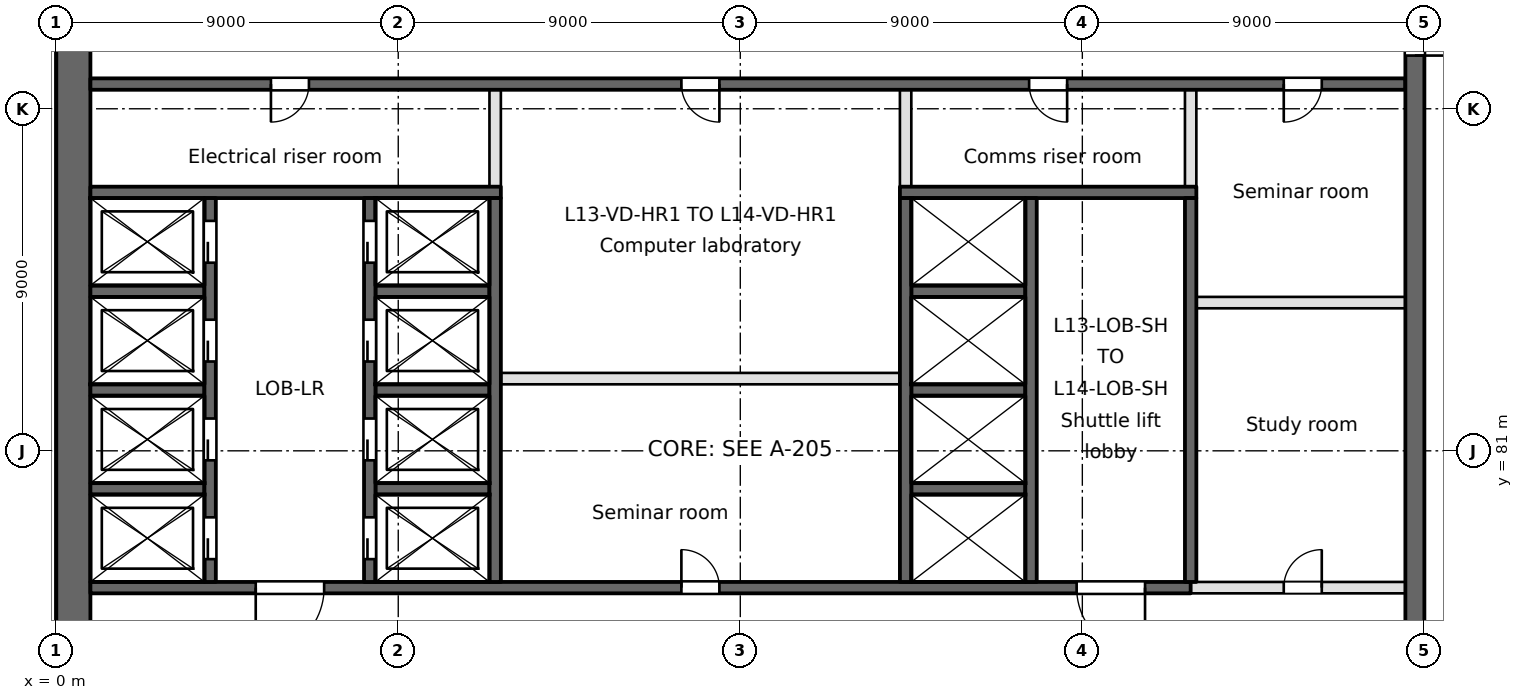
"""IFC4 building model, lengths in metres.
Left out: names, types, materials, properties, quantities, classifications, styles, units other than length and angle.
Written with IfcOpenShell. Run it as: python <this file> out.ifc"""

import sys

from ifc_helpers import new_model, si_unit, direction, frame, frame_2d, origin, place, context, subcontext, project, spatial, rectangle, extrude, element, fill, save


model = new_model("IFC4")
c1 = context("Model", 3, precision=1e-05, world=origin(), true_north=direction((0.0, 1.0)))
c2 = subcontext(c1, "Body", "Model", "MODEL_VIEW")
j1 = project(units=[si_unit("LENGTHUNIT", "METRE"), si_unit("PLANEANGLEUNIT", "RADIAN")], contexts=[c1])
p1 = place(None, origin())
s1 = spatial("IfcSite", under=j1, at=p1, CompositionType="ELEMENT")
p2 = place(p1, origin())
s2 = spatial("IfcBuilding", under=s1, at=p2, CompositionType="ELEMENT")
p3 = place(p2, frame((0.0, 0.0, 58.0)))
s3 = spatial("IfcBuildingStorey", under=s2, at=p3, CompositionType="ELEMENT", Elevation=58.0)
p4 = place(p3, frame((0.45, 94.5, 0.0), z_axis=(0.0, 0.0, 1.0), x_axis=(0.0, -1.0, 0.0)))
e1 = element("IfcWall", 1, at=p4, inside=s3, PredefinedType="SHEAR", context=c2, shape_type="SweptSolid", body=[
    extrude(rectangle(XDim=66.187, YDim=0.9, at=frame_2d((33.094, 0.0))), origin(), (0.0, 0.0, 1.0), 3.7),
])
p5 = place(p3, frame((0.9, 77.4, -0.4), z_axis=(0.0, 0.0, 1.0), x_axis=(1.0, 0.0, 0.0)))
e2 = element("IfcWall", 2, at=p5, inside=s3, PredefinedType="SOLIDWALL", context=c2, shape_type="SweptSolid", body=[
    extrude(rectangle(XDim=28.95, YDim=0.3, at=frame_2d((14.475, 0.0))), origin(), (0.0, 0.0, 1.0), 3.7),
])
p6 = place(p5, frame((4.35, 0.0, 0.4)))
e3 = element("IfcOpeningElement", 3, at=p6, cuts=e2, PredefinedType="OPENING", context=c2, shape_type="SweptSolid", body=[
    extrude(rectangle(XDim=1.8, YDim=2.1, at=frame_2d((0.9, 1.05))), frame((0.0, 0.15, 0.0), z_axis=(0.0, -1.0, 0.0), x_axis=(1.0, 0.0, 0.0)), (0.0, 0.0, 1.0), 0.3),
])
p7 = place(p5, frame((25.95, 0.0, 0.4)))
e4 = element("IfcOpeningElement", 4, at=p7, cuts=e2, PredefinedType="OPENING", context=c2, shape_type="SweptSolid", body=[
    extrude(rectangle(XDim=1.8, YDim=2.1, at=frame_2d((0.9, 1.05))), frame((0.0, 0.15, 0.0), z_axis=(0.0, -1.0, 0.0), x_axis=(1.0, 0.0, 0.0)), (0.0, 0.0, 1.0), 0.3),
])
p8 = place(p5, frame((15.55, 0.0, 0.4)))
e5 = element("IfcOpeningElement", 5, at=p8, cuts=e2, PredefinedType="OPENING", context=c2, shape_type="SweptSolid", body=[
    extrude(rectangle(XDim=1.0, YDim=2.1, at=frame_2d((0.5, 1.05))), frame((0.0, 0.15, 0.0), z_axis=(0.0, -1.0, 0.0), x_axis=(1.0, 0.0, 0.0)), (0.0, 0.0, 1.0), 0.3),
])
p9 = place(p3, frame((29.85, 77.4, 0.0), z_axis=(0.0, 0.0, 1.0), x_axis=(1.0, 0.0, 0.0)))
e6 = element("IfcWall", 6, at=p9, inside=s3, PredefinedType="PARTITIONING", context=c2, shape_type="SweptSolid", body=[
    extrude(rectangle(XDim=5.65, YDim=0.3, at=frame_2d((2.825, 0.0))), origin(), (0.0, 0.0, 1.0), 3.3),
])
p10 = place(p9, frame((2.45, 0.0, 0.0)))
e7 = element("IfcOpeningElement", 7, at=p10, cuts=e6, PredefinedType="OPENING", context=c2, shape_type="SweptSolid", body=[
    extrude(rectangle(XDim=1.0, YDim=2.1, at=frame_2d((0.5, 1.05))), frame((0.0, 0.15, 0.0), z_axis=(0.0, -1.0, 0.0), x_axis=(1.0, 0.0, 0.0)), (0.0, 0.0, 1.0), 0.3),
])
for number, where, z_axis, x_axis in (
    (8, (0.9, 80.0, -0.4), (0.0, 0.0, 1.0), (1.0, 0.0, 0.0)),
    (9, (8.4, 80.0, -0.4), (0.0, 0.0, 1.0), (1.0, 0.0, 0.0)),
    (10, (22.5, 80.0, -0.4), (0.0, 0.0, 1.0), (1.0, 0.0, 0.0)),
    (11, (0.9, 82.6, -0.4), (0.0, 0.0, 1.0), (1.0, 0.0, 0.0)),
    (12, (8.4, 82.6, -0.4), (0.0, 0.0, 1.0), (1.0, 0.0, 0.0)),
    (13, (22.5, 82.6, -0.4), (0.0, 0.0, 1.0), (1.0, 0.0, 0.0)),
):
    element("IfcWall", number, at=place(p3, frame(where, z_axis=z_axis, x_axis=x_axis)), inside=s3, PredefinedType="SOLIDWALL", context=c2, shape_type="SweptSolid", body=[
        extrude(rectangle(XDim=3.0, YDim=0.3, at=frame_2d((1.5, 0.0))), origin(), (0.0, 0.0, 1.0), 3.7),
    ])
p11 = place(p3, frame((11.7, 82.9, 0.0), z_axis=(0.0, 0.0, 1.0), x_axis=(1.0, 0.0, 0.0)))
e14 = element("IfcWall", 14, at=p11, inside=s3, PredefinedType="PARTITIONING", context=c2, shape_type="SweptSolid", body=[
    extrude(rectangle(XDim=10.5, YDim=0.3, at=frame_2d((5.25, 0.0))), origin(), (0.0, 0.0, 1.0), 3.3),
])
p12 = place(p3, frame((30.0, 84.9, 0.0), z_axis=(0.0, 0.0, 1.0), x_axis=(1.0, 0.0, 0.0)))
e15 = element("IfcWall", 15, at=p12, inside=s3, PredefinedType="PARTITIONING", context=c2, shape_type="SweptSolid", body=[
    extrude(rectangle(XDim=5.5, YDim=0.3, at=frame_2d((2.75, 0.0))), origin(), (0.0, 0.0, 1.0), 3.3),
])
for number, where, z_axis, x_axis in (
    (16, (0.9, 85.2, -0.4), (0.0, 0.0, 1.0), (1.0, 0.0, 0.0)),
    (17, (8.4, 85.2, -0.4), (0.0, 0.0, 1.0), (1.0, 0.0, 0.0)),
    (18, (22.5, 85.2, -0.4), (0.0, 0.0, 1.0), (1.0, 0.0, 0.0)),
):
    element("IfcWall", number, at=place(p3, frame(where, z_axis=z_axis, x_axis=x_axis)), inside=s3, PredefinedType="SOLIDWALL", context=c2, shape_type="SweptSolid", body=[
        extrude(rectangle(XDim=3.0, YDim=0.3, at=frame_2d((1.5, 0.0))), origin(), (0.0, 0.0, 1.0), 3.7),
    ])
p13 = place(p3, frame((0.9, 87.8, -0.4), z_axis=(0.0, 0.0, 1.0), x_axis=(1.0, 0.0, 0.0)))
e19 = element("IfcWall", 19, at=p13, inside=s3, PredefinedType="SOLIDWALL", context=c2, shape_type="SweptSolid", body=[
    extrude(rectangle(XDim=10.8, YDim=0.3, at=frame_2d((5.4, 0.0))), origin(), (0.0, 0.0, 1.0), 3.7),
])
p14 = place(p3, frame((22.2, 87.8, -0.4), z_axis=(0.0, 0.0, 1.0), x_axis=(1.0, 0.0, 0.0)))
e20 = element("IfcWall", 20, at=p14, inside=s3, PredefinedType="SOLIDWALL", context=c2, shape_type="SweptSolid", body=[
    extrude(rectangle(XDim=7.8, YDim=0.3, at=frame_2d((3.9, 0.0))), origin(), (0.0, 0.0, 1.0), 3.7),
])
p15 = place(p3, frame((0.9, 90.65, -0.4), z_axis=(0.0, 0.0, 1.0), x_axis=(1.0, 0.0, 0.0)))
e21 = element("IfcWall", 21, at=p15, inside=s3, PredefinedType="SOLIDWALL", context=c2, shape_type="SweptSolid", body=[
    extrude(rectangle(XDim=34.6, YDim=0.3, at=frame_2d((17.3, 0.0))), origin(), (0.0, 0.0, 1.0), 3.7),
])
p16 = place(p15, frame((4.75, 0.0, 0.4)))
e22 = element("IfcOpeningElement", 22, at=p16, cuts=e21, PredefinedType="OPENING", context=c2, shape_type="SweptSolid", body=[
    extrude(rectangle(XDim=1.0, YDim=2.1, at=frame_2d((0.5, 1.05))), frame((0.0, 0.15, 0.0), z_axis=(0.0, -1.0, 0.0), x_axis=(1.0, 0.0, 0.0)), (0.0, 0.0, 1.0), 0.3),
])
p17 = place(p15, frame((24.7, 0.0, 0.4)))
e23 = element("IfcOpeningElement", 23, at=p17, cuts=e21, PredefinedType="OPENING", context=c2, shape_type="SweptSolid", body=[
    extrude(rectangle(XDim=1.0, YDim=2.1, at=frame_2d((0.5, 1.05))), frame((0.0, 0.15, 0.0), z_axis=(0.0, -1.0, 0.0), x_axis=(1.0, 0.0, 0.0)), (0.0, 0.0, 1.0), 0.3),
])
p18 = place(p15, frame((15.55, 0.0, 0.4)))
e24 = element("IfcOpeningElement", 24, at=p18, cuts=e21, PredefinedType="OPENING", context=c2, shape_type="SweptSolid", body=[
    extrude(rectangle(XDim=1.0, YDim=2.1, at=frame_2d((0.5, 1.05))), frame((0.0, 0.15, 0.0), z_axis=(0.0, -1.0, 0.0), x_axis=(1.0, 0.0, 0.0)), (0.0, 0.0, 1.0), 0.3),
])
p19 = place(p15, frame((31.4, 0.0, 0.4)))
e25 = element("IfcOpeningElement", 25, at=p19, cuts=e21, PredefinedType="OPENING", context=c2, shape_type="SweptSolid", body=[
    extrude(rectangle(XDim=1.0, YDim=2.1, at=frame_2d((0.5, 1.05))), frame((0.0, 0.15, 0.0), z_axis=(0.0, -1.0, 0.0), x_axis=(1.0, 0.0, 0.0)), (0.0, 0.0, 1.0), 0.3),
])
p20 = place(p3, frame((4.05, 77.55, -0.4), z_axis=(0.0, 0.0, 1.0), x_axis=(0.0, 1.0, 0.0)))
e26 = element("IfcWall", 26, at=p20, inside=s3, PredefinedType="SOLIDWALL", context=c2, shape_type="SweptSolid", body=[
    extrude(rectangle(XDim=10.1, YDim=0.3, at=frame_2d((5.05, 0.0))), origin(), (0.0, 0.0, 1.0), 3.7),
])
p21 = place(p20, frame((0.6, 0.0, 0.4)))
e27 = element("IfcOpeningElement", 27, at=p21, cuts=e26, PredefinedType="OPENING", context=c2, shape_type="SweptSolid", body=[
    extrude(rectangle(XDim=1.1, YDim=2.1, at=frame_2d((0.55, 1.05))), frame((0.0, 0.15, 0.0), z_axis=(0.0, -1.0, 0.0), x_axis=(1.0, 0.0, 0.0)), (0.0, 0.0, 1.0), 0.3),
])
p22 = place(p20, frame((3.2, 0.0, 0.4)))
e28 = element("IfcOpeningElement", 28, at=p22, cuts=e26, PredefinedType="OPENING", context=c2, shape_type="SweptSolid", body=[
    extrude(rectangle(XDim=1.1, YDim=2.1, at=frame_2d((0.55, 1.05))), frame((0.0, 0.15, 0.0), z_axis=(0.0, -1.0, 0.0), x_axis=(1.0, 0.0, 0.0)), (0.0, 0.0, 1.0), 0.3),
])
p23 = place(p20, frame((5.8, 0.0, 0.4)))
e29 = element("IfcOpeningElement", 29, at=p23, cuts=e26, PredefinedType="OPENING", context=c2, shape_type="SweptSolid", body=[
    extrude(rectangle(XDim=1.1, YDim=2.1, at=frame_2d((0.55, 1.05))), frame((0.0, 0.15, 0.0), z_axis=(0.0, -1.0, 0.0), x_axis=(1.0, 0.0, 0.0)), (0.0, 0.0, 1.0), 0.3),
])
p24 = place(p20, frame((8.4, 0.0, 0.4)))
e30 = element("IfcOpeningElement", 30, at=p24, cuts=e26, PredefinedType="OPENING", context=c2, shape_type="SweptSolid", body=[
    extrude(rectangle(XDim=1.1, YDim=2.1, at=frame_2d((0.55, 1.05))), frame((0.0, 0.15, 0.0), z_axis=(0.0, -1.0, 0.0), x_axis=(1.0, 0.0, 0.0)), (0.0, 0.0, 1.0), 0.3),
])
p25 = place(p3, frame((8.25, 77.55, -0.4), z_axis=(0.0, 0.0, 1.0), x_axis=(0.0, 1.0, 0.0)))
e31 = element("IfcWall", 31, at=p25, inside=s3, PredefinedType="SOLIDWALL", context=c2, shape_type="SweptSolid", body=[
    extrude(rectangle(XDim=10.1, YDim=0.3, at=frame_2d((5.05, 0.0))), origin(), (0.0, 0.0, 1.0), 3.7),
])
p26 = place(p25, frame((0.6, 0.0, 0.4)))
e32 = element("IfcOpeningElement", 32, at=p26, cuts=e31, PredefinedType="OPENING", context=c2, shape_type="SweptSolid", body=[
    extrude(rectangle(XDim=1.1, YDim=2.1, at=frame_2d((0.55, 1.05))), frame((0.0, 0.15, 0.0), z_axis=(0.0, -1.0, 0.0), x_axis=(1.0, 0.0, 0.0)), (0.0, 0.0, 1.0), 0.3),
])
p27 = place(p25, frame((3.2, 0.0, 0.4)))
e33 = element("IfcOpeningElement", 33, at=p27, cuts=e31, PredefinedType="OPENING", context=c2, shape_type="SweptSolid", body=[
    extrude(rectangle(XDim=1.1, YDim=2.1, at=frame_2d((0.55, 1.05))), frame((0.0, 0.15, 0.0), z_axis=(0.0, -1.0, 0.0), x_axis=(1.0, 0.0, 0.0)), (0.0, 0.0, 1.0), 0.3),
])
p28 = place(p25, frame((5.8, 0.0, 0.4)))
e34 = element("IfcOpeningElement", 34, at=p28, cuts=e31, PredefinedType="OPENING", context=c2, shape_type="SweptSolid", body=[
    extrude(rectangle(XDim=1.1, YDim=2.1, at=frame_2d((0.55, 1.05))), frame((0.0, 0.15, 0.0), z_axis=(0.0, -1.0, 0.0), x_axis=(1.0, 0.0, 0.0)), (0.0, 0.0, 1.0), 0.3),
])
p29 = place(p25, frame((8.4, 0.0, 0.4)))
e35 = element("IfcOpeningElement", 35, at=p29, cuts=e31, PredefinedType="OPENING", context=c2, shape_type="SweptSolid", body=[
    extrude(rectangle(XDim=1.1, YDim=2.1, at=frame_2d((0.55, 1.05))), frame((0.0, 0.15, 0.0), z_axis=(0.0, -1.0, 0.0), x_axis=(1.0, 0.0, 0.0)), (0.0, 0.0, 1.0), 0.3),
])
p30 = place(p3, frame((11.55, 77.55, -0.4), z_axis=(0.0, 0.0, 1.0), x_axis=(0.0, 1.0, 0.0)))
e36 = element("IfcWall", 36, at=p30, inside=s3, PredefinedType="SOLIDWALL", context=c2, shape_type="SweptSolid", body=[
    extrude(rectangle(XDim=10.1, YDim=0.3, at=frame_2d((5.05, 0.0))), origin(), (0.0, 0.0, 1.0), 3.7),
])
p31 = place(p3, frame((11.55, 87.95, 0.0), z_axis=(0.0, 0.0, 1.0), x_axis=(0.0, 1.0, 0.0)))
e37 = element("IfcWall", 37, at=p31, inside=s3, PredefinedType="PARTITIONING", context=c2, shape_type="SweptSolid", body=[
    extrude(rectangle(XDim=2.55, YDim=0.3, at=frame_2d((1.275, 0.0))), origin(), (0.0, 0.0, 1.0), 3.3),
])
p32 = place(p3, frame((22.35, 77.55, -0.4), z_axis=(0.0, 0.0, 1.0), x_axis=(0.0, 1.0, 0.0)))
e38 = element("IfcWall", 38, at=p32, inside=s3, PredefinedType="SOLIDWALL", context=c2, shape_type="SweptSolid", body=[
    extrude(rectangle(XDim=10.1, YDim=0.3, at=frame_2d((5.05, 0.0))), origin(), (0.0, 0.0, 1.0), 3.7),
])
p33 = place(p3, frame((22.35, 87.95, 0.0), z_axis=(0.0, 0.0, 1.0), x_axis=(0.0, 1.0, 0.0)))
e39 = element("IfcWall", 39, at=p33, inside=s3, PredefinedType="PARTITIONING", context=c2, shape_type="SweptSolid", body=[
    extrude(rectangle(XDim=2.55, YDim=0.3, at=frame_2d((1.275, 0.0))), origin(), (0.0, 0.0, 1.0), 3.3),
])
for number, where, z_axis, x_axis in (
    (40, (25.65, 77.55, -0.4), (0.0, 0.0, 1.0), (0.0, 1.0, 0.0)),
    (41, (29.85, 77.55, -0.4), (0.0, 0.0, 1.0), (0.0, 1.0, 0.0)),
):
    element("IfcWall", number, at=place(p3, frame(where, z_axis=z_axis, x_axis=x_axis)), inside=s3, PredefinedType="SOLIDWALL", context=c2, shape_type="SweptSolid", body=[
        extrude(rectangle(XDim=10.1, YDim=0.3, at=frame_2d((5.05, 0.0))), origin(), (0.0, 0.0, 1.0), 3.7),
    ])
p34 = place(p3, frame((29.85, 87.95, 0.0), z_axis=(0.0, 0.0, 1.0), x_axis=(0.0, 1.0, 0.0)))
e42 = element("IfcWall", 42, at=p34, inside=s3, PredefinedType="PARTITIONING", context=c2, shape_type="SweptSolid", body=[
    extrude(rectangle(XDim=2.55, YDim=0.3, at=frame_2d((1.275, 0.0))), origin(), (0.0, 0.0, 1.0), 3.3),
])
p35 = place(p3, frame((35.75, 63.5, -0.4), z_axis=(0.0, 0.0, 1.0), x_axis=(0.0, 1.0, 0.0)))
e43 = element("IfcWall", 43, at=p35, inside=s3, PredefinedType="SOLIDWALL", context=c2, shape_type="SweptSolid", body=[
    extrude(rectangle(XDim=34.6, YDim=0.5, at=frame_2d((17.3, 0.0))), origin(), (0.0, 0.0, 1.0), 3.7),
])
p36 = place(p35, frame((9.7, 0.0, 0.4)))
e44 = element("IfcOpeningElement", 44, at=p36, cuts=e43, PredefinedType="OPENING", context=c2, shape_type="SweptSolid", body=[
    extrude(rectangle(XDim=2.4, YDim=2.1, at=frame_2d((1.2, 1.05))), frame((0.0, 0.25, 0.0), z_axis=(0.0, -1.0, 0.0), x_axis=(1.0, 0.0, 0.0)), (0.0, 0.0, 1.0), 0.5),
])
p37 = place(p35, frame((27.9, 0.0, 0.4)))
e45 = element("IfcOpeningElement", 45, at=p37, cuts=e43, PredefinedType="OPENING", context=c2, shape_type="SweptSolid", body=[
    extrude(rectangle(XDim=1.5, YDim=2.1, at=frame_2d((0.75, 1.05))), frame((0.0, 0.25, 0.0), z_axis=(0.0, -1.0, 0.0), x_axis=(1.0, 0.0, 0.0)), (0.0, 0.0, 1.0), 0.5),
])
p38 = place(p35, frame((1.5, 0.0, 0.4)))
e46 = element("IfcOpeningElement", 46, at=p38, cuts=e43, PredefinedType="OPENING", context=c2, shape_type="SweptSolid", body=[
    extrude(rectangle(XDim=1.2, YDim=2.1, at=frame_2d((0.6, 1.05))), frame((0.0, 0.25, 0.0), z_axis=(0.0, -1.0, 0.0), x_axis=(1.0, 0.0, 0.0)), (0.0, 0.0, 1.0), 0.5),
])
p39 = place(p21, origin())
e47 = element("IfcDoor", 47, at=p39, inside=s3, OperationType="SLIDING_TO_RIGHT", PredefinedType="DOOR", context=c2, shape_type="SweptSolid", body=[
    extrude(rectangle(XDim=1.1, YDim=2.1, at=frame_2d((0.55, 1.05))), frame((0.0, 0.025, 0.0), z_axis=(0.0, -1.0, 0.0), x_axis=(1.0, 0.0, 0.0)), (0.0, 0.0, 1.0), 0.05),
])
fill(e27, e47)
p40 = place(p22, origin())
e48 = element("IfcDoor", 48, at=p40, inside=s3, OperationType="SLIDING_TO_LEFT", PredefinedType="DOOR", context=c2, shape_type="SweptSolid", body=[
    extrude(rectangle(XDim=1.1, YDim=2.1, at=frame_2d((0.55, 1.05))), frame((0.0, 0.025, 0.0), z_axis=(0.0, -1.0, 0.0), x_axis=(1.0, 0.0, 0.0)), (0.0, 0.0, 1.0), 0.05),
])
fill(e28, e48)
p41 = place(p23, origin())
e49 = element("IfcDoor", 49, at=p41, inside=s3, OperationType="SLIDING_TO_RIGHT", PredefinedType="DOOR", context=c2, shape_type="SweptSolid", body=[
    extrude(rectangle(XDim=1.1, YDim=2.1, at=frame_2d((0.55, 1.05))), frame((0.0, 0.025, 0.0), z_axis=(0.0, -1.0, 0.0), x_axis=(1.0, 0.0, 0.0)), (0.0, 0.0, 1.0), 0.05),
])
fill(e29, e49)
p42 = place(p24, origin())
e50 = element("IfcDoor", 50, at=p42, inside=s3, OperationType="SLIDING_TO_LEFT", PredefinedType="DOOR", context=c2, shape_type="SweptSolid", body=[
    extrude(rectangle(XDim=1.1, YDim=2.1, at=frame_2d((0.55, 1.05))), frame((0.0, 0.025, 0.0), z_axis=(0.0, -1.0, 0.0), x_axis=(1.0, 0.0, 0.0)), (0.0, 0.0, 1.0), 0.05),
])
fill(e30, e50)
p43 = place(p26, origin())
e51 = element("IfcDoor", 51, at=p43, inside=s3, OperationType="SLIDING_TO_RIGHT", PredefinedType="DOOR", context=c2, shape_type="SweptSolid", body=[
    extrude(rectangle(XDim=1.1, YDim=2.1, at=frame_2d((0.55, 1.05))), frame((0.0, 0.025, 0.0), z_axis=(0.0, -1.0, 0.0), x_axis=(1.0, 0.0, 0.0)), (0.0, 0.0, 1.0), 0.05),
])
fill(e32, e51)
p44 = place(p27, origin())
e52 = element("IfcDoor", 52, at=p44, inside=s3, OperationType="SLIDING_TO_LEFT", PredefinedType="DOOR", context=c2, shape_type="SweptSolid", body=[
    extrude(rectangle(XDim=1.1, YDim=2.1, at=frame_2d((0.55, 1.05))), frame((0.0, 0.025, 0.0), z_axis=(0.0, -1.0, 0.0), x_axis=(1.0, 0.0, 0.0)), (0.0, 0.0, 1.0), 0.05),
])
fill(e33, e52)
p45 = place(p28, origin())
e53 = element("IfcDoor", 53, at=p45, inside=s3, OperationType="SLIDING_TO_RIGHT", PredefinedType="DOOR", context=c2, shape_type="SweptSolid", body=[
    extrude(rectangle(XDim=1.1, YDim=2.1, at=frame_2d((0.55, 1.05))), frame((0.0, 0.025, 0.0), z_axis=(0.0, -1.0, 0.0), x_axis=(1.0, 0.0, 0.0)), (0.0, 0.0, 1.0), 0.05),
])
fill(e34, e53)
p46 = place(p29, origin())
e54 = element("IfcDoor", 54, at=p46, inside=s3, OperationType="SLIDING_TO_LEFT", PredefinedType="DOOR", context=c2, shape_type="SweptSolid", body=[
    extrude(rectangle(XDim=1.1, YDim=2.1, at=frame_2d((0.55, 1.05))), frame((0.0, 0.025, 0.0), z_axis=(0.0, -1.0, 0.0), x_axis=(1.0, 0.0, 0.0)), (0.0, 0.0, 1.0), 0.05),
])
fill(e35, e54)
p47 = place(p6, frame((1.8, 0.0, 0.0), z_axis=(0.0, 0.0, 1.0), x_axis=(-1.0, 0.0, 0.0)))
e55 = element("IfcDoor", 55, at=p47, inside=s3, OperationType="SINGLE_SWING_RIGHT", PredefinedType="DOOR", context=c2, shape_type="SweptSolid", body=[
    extrude(rectangle(XDim=1.8, YDim=2.1, at=frame_2d((0.9, 1.05))), frame((0.0, 0.025, 0.0), z_axis=(0.0, -1.0, 0.0), x_axis=(1.0, 0.0, 0.0)), (0.0, 0.0, 1.0), 0.05),
])
fill(e3, e55)
p48 = place(p7, frame((1.8, 0.0, 0.0), z_axis=(0.0, 0.0, 1.0), x_axis=(-1.0, 0.0, 0.0)))
e56 = element("IfcDoor", 56, at=p48, inside=s3, OperationType="SINGLE_SWING_LEFT", PredefinedType="DOOR", context=c2, shape_type="SweptSolid", body=[
    extrude(rectangle(XDim=1.8, YDim=2.1, at=frame_2d((0.9, 1.05))), frame((0.0, 0.025, 0.0), z_axis=(0.0, -1.0, 0.0), x_axis=(1.0, 0.0, 0.0)), (0.0, 0.0, 1.0), 0.05),
])
fill(e4, e56)
p49 = place(p37, frame((1.5, 0.0, 0.0), z_axis=(0.0, 0.0, 1.0), x_axis=(-1.0, 0.0, 0.0)))
e57 = element("IfcDoor", 57, at=p49, inside=s3, OperationType="SINGLE_SWING_RIGHT", PredefinedType="DOOR", context=c2, shape_type="SweptSolid", body=[
    extrude(rectangle(XDim=1.5, YDim=2.1, at=frame_2d((0.75, 1.05))), frame((0.0, 0.025, 0.0), z_axis=(0.0, -1.0, 0.0), x_axis=(1.0, 0.0, 0.0)), (0.0, 0.0, 1.0), 0.05),
])
fill(e45, e57)
p50 = place(p16, frame((1.0, 0.0, 0.0), z_axis=(0.0, 0.0, 1.0), x_axis=(-1.0, 0.0, 0.0)))
e58 = element("IfcDoor", 58, at=p50, inside=s3, OperationType="SINGLE_SWING_RIGHT", PredefinedType="DOOR", context=c2, shape_type="SweptSolid", body=[
    extrude(rectangle(XDim=1.0, YDim=2.1, at=frame_2d((0.5, 1.05))), frame((0.0, 0.025, 0.0), z_axis=(0.0, -1.0, 0.0), x_axis=(1.0, 0.0, 0.0)), (0.0, 0.0, 1.0), 0.05),
])
fill(e22, e58)
p51 = place(p17, frame((1.0, 0.0, 0.0), z_axis=(0.0, 0.0, 1.0), x_axis=(-1.0, 0.0, 0.0)))
e59 = element("IfcDoor", 59, at=p51, inside=s3, OperationType="SINGLE_SWING_LEFT", PredefinedType="DOOR", context=c2, shape_type="SweptSolid", body=[
    extrude(rectangle(XDim=1.0, YDim=2.1, at=frame_2d((0.5, 1.05))), frame((0.0, 0.025, 0.0), z_axis=(0.0, -1.0, 0.0), x_axis=(1.0, 0.0, 0.0)), (0.0, 0.0, 1.0), 0.05),
])
fill(e23, e59)
p52 = place(p8, origin())
e60 = element("IfcDoor", 60, at=p52, inside=s3, OperationType="SINGLE_SWING_LEFT", PredefinedType="DOOR", context=c2, shape_type="SweptSolid", body=[
    extrude(rectangle(XDim=1.0, YDim=2.1, at=frame_2d((0.5, 1.05))), frame((0.0, 0.025, 0.0), z_axis=(0.0, -1.0, 0.0), x_axis=(1.0, 0.0, 0.0)), (0.0, 0.0, 1.0), 0.05),
])
fill(e5, e60)
p53 = place(p18, frame((1.0, 0.0, 0.0), z_axis=(0.0, 0.0, 1.0), x_axis=(-1.0, 0.0, 0.0)))
e61 = element("IfcDoor", 61, at=p53, inside=s3, OperationType="SINGLE_SWING_LEFT", PredefinedType="DOOR", context=c2, shape_type="SweptSolid", body=[
    extrude(rectangle(XDim=1.0, YDim=2.1, at=frame_2d((0.5, 1.05))), frame((0.0, 0.025, 0.0), z_axis=(0.0, -1.0, 0.0), x_axis=(1.0, 0.0, 0.0)), (0.0, 0.0, 1.0), 0.05),
])
fill(e24, e61)
p54 = place(p10, origin())
e62 = element("IfcDoor", 62, at=p54, inside=s3, OperationType="SINGLE_SWING_RIGHT", PredefinedType="DOOR", context=c2, shape_type="SweptSolid", body=[
    extrude(rectangle(XDim=1.0, YDim=2.1, at=frame_2d((0.5, 1.05))), frame((0.0, 0.025, 0.0), z_axis=(0.0, -1.0, 0.0), x_axis=(1.0, 0.0, 0.0)), (0.0, 0.0, 1.0), 0.05),
])
fill(e7, e62)
p55 = place(p19, frame((1.0, 0.0, 0.0), z_axis=(0.0, 0.0, 1.0), x_axis=(-1.0, 0.0, 0.0)))
e63 = element("IfcDoor", 63, at=p55, inside=s3, OperationType="SINGLE_SWING_RIGHT", PredefinedType="DOOR", context=c2, shape_type="SweptSolid", body=[
    extrude(rectangle(XDim=1.0, YDim=2.1, at=frame_2d((0.5, 1.05))), frame((0.0, 0.025, 0.0), z_axis=(0.0, -1.0, 0.0), x_axis=(1.0, 0.0, 0.0)), (0.0, 0.0, 1.0), 0.05),
])
fill(e25, e63)
save(model, sys.argv[1])
